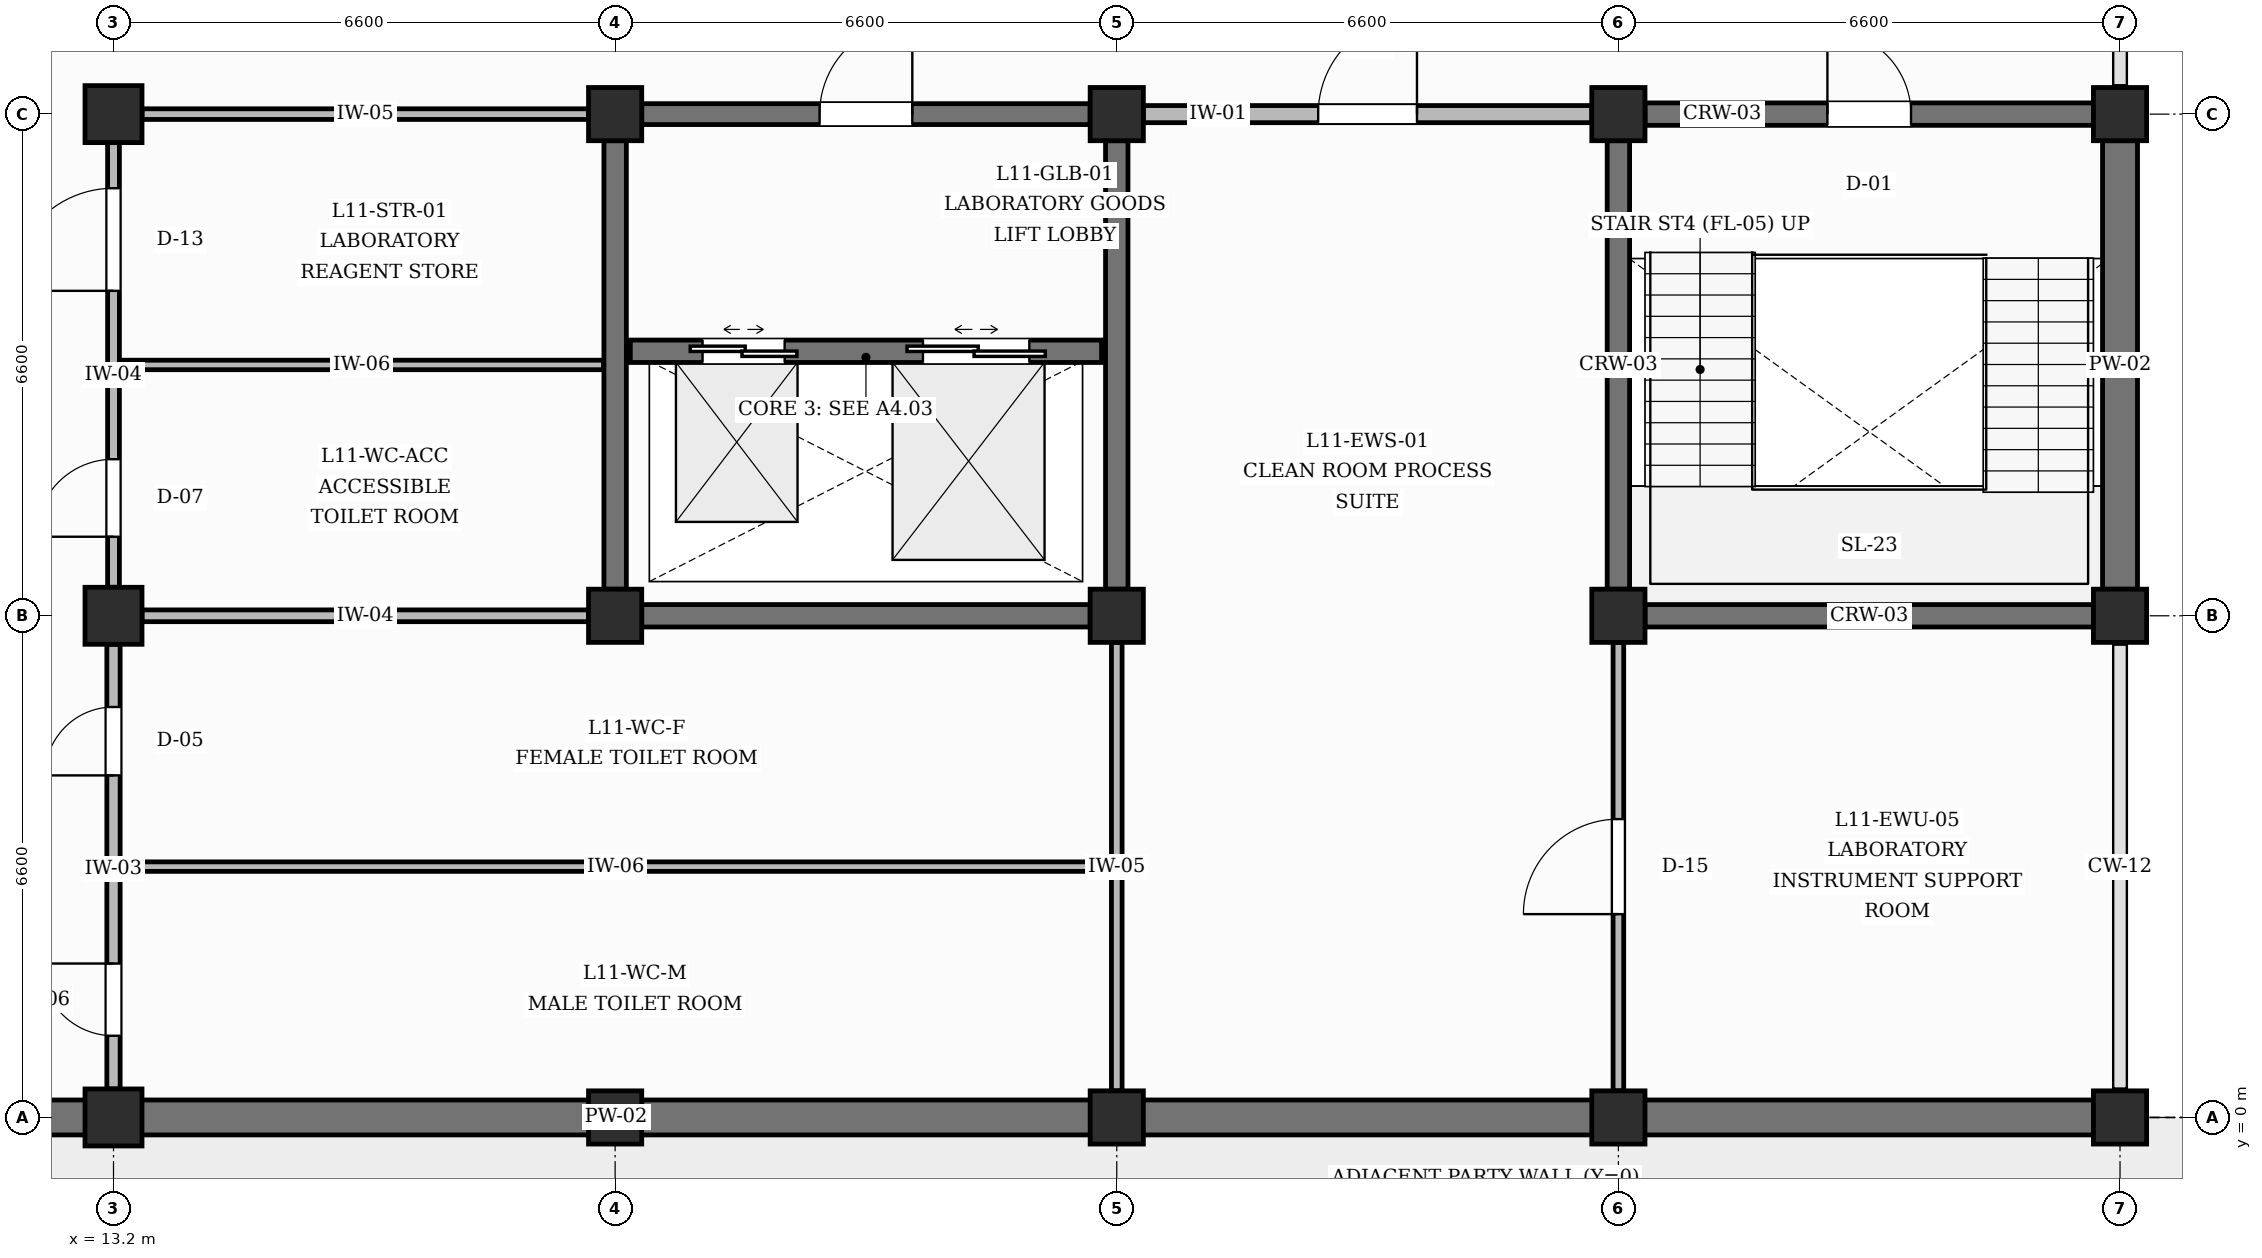
"""IFC4 building model, lengths in metres.
Left out: names, types, materials, properties, quantities, classifications, styles, units other than length and angle.
Written with IfcOpenShell. Run it as: python <this file> out.ifc"""

import sys

from ifc_helpers import new_model, si_unit, direction, frame, frame_2d, origin, origin_2d, place, context, subcontext, project, spatial, rectangle, extrude, element, fill, save


model = new_model("IFC4")
c1 = context("Model", 3, precision=1e-05, world=origin(), true_north=direction((0.0, 1.0)))
c2 = subcontext(c1, "Body", "Model", "MODEL_VIEW")
j1 = project(units=[si_unit("LENGTHUNIT", "METRE"), si_unit("PLANEANGLEUNIT", "RADIAN")], contexts=[c1])
p1 = place(None, origin())
s1 = spatial("IfcSite", under=j1, at=p1, CompositionType="ELEMENT")
p2 = place(p1, origin())
s2 = spatial("IfcBuilding", under=s1, at=p2, CompositionType="ELEMENT")
p3 = place(p2, frame((0.0, 0.0, 48.0)))
s3 = spatial("IfcBuildingStorey", under=s2, at=p3, CompositionType="ELEMENT", Elevation=48.0)
for number, where, z_axis, x_axis in (
    (1, (13.2, 0.0, 0.0), (0.0, 0.0, 1.0), (1.0, 0.0, 0.0)),
    (2, (13.2, 6.6, 0.0), (0.0, 0.0, 1.0), (1.0, 0.0, 0.0)),
    (3, (13.2, 13.2, 0.0), (0.0, 0.0, 1.0), (1.0, 0.0, 0.0)),
):
    element("IfcColumn", number, at=place(p3, frame(where, z_axis=z_axis, x_axis=x_axis)), inside=s3, PredefinedType="COLUMN", context=c2, shape_type="SweptSolid", body=[
        extrude(rectangle(XDim=0.75, YDim=0.75, at=origin_2d()), origin(), (0.0, 0.0, 1.0), 4.2),
    ])
for number, where, z_axis, x_axis in (
    (4, (19.8, 0.0, 0.0), (0.0, 0.0, 1.0), (1.0, 0.0, 0.0)),
    (5, (19.8, 6.6, 0.0), (0.0, 0.0, 1.0), (1.0, 0.0, 0.0)),
    (6, (19.8, 13.2, 0.0), (0.0, 0.0, 1.0), (1.0, 0.0, 0.0)),
    (7, (26.4, 0.0, 0.0), (0.0, 0.0, 1.0), (1.0, 0.0, 0.0)),
    (8, (26.4, 6.6, 0.0), (0.0, 0.0, 1.0), (1.0, 0.0, 0.0)),
    (9, (26.4, 13.2, 0.0), (0.0, 0.0, 1.0), (1.0, 0.0, 0.0)),
    (10, (33.0, 0.0, 0.0), (0.0, 0.0, 1.0), (1.0, 0.0, 0.0)),
    (11, (33.0, 6.6, 0.0), (0.0, 0.0, 1.0), (1.0, 0.0, 0.0)),
    (12, (33.0, 13.2, 0.0), (0.0, 0.0, 1.0), (1.0, 0.0, 0.0)),
    (13, (39.6, 0.0, 0.0), (0.0, 0.0, 1.0), (1.0, 0.0, 0.0)),
    (14, (39.6, 6.6, 0.0), (0.0, 0.0, 1.0), (1.0, 0.0, 0.0)),
    (15, (39.6, 13.2, 0.0), (0.0, 0.0, 1.0), (1.0, 0.0, 0.0)),
):
    element("IfcColumn", number, at=place(p3, frame(where, z_axis=z_axis, x_axis=x_axis)), inside=s3, PredefinedType="COLUMN", context=c2, shape_type="SweptSolid", body=[
        extrude(rectangle(XDim=0.7, YDim=0.7, at=origin_2d()), origin(), (0.0, 0.0, 1.0), 4.2),
    ])
p4 = place(p3, frame((6.975, 0.0, 0.0), z_axis=(0.0, 0.0, 1.0), x_axis=(1.0, 0.0, 0.0)))
e16 = element("IfcWall", 16, at=p4, inside=s3, PredefinedType="SOLIDWALL", context=c2, shape_type="SweptSolid", body=[
    extrude(rectangle(XDim=5.85, YDim=0.46, at=frame_2d((2.925, 0.0))), origin(), (0.0, 0.0, 1.0), 3.29),
])
p5 = place(p3, frame((13.575, 0.0, 0.0), z_axis=(0.0, 0.0, 1.0), x_axis=(1.0, 0.0, 0.0)))
e17 = element("IfcWall", 17, at=p5, inside=s3, PredefinedType="SOLIDWALL", context=c2, shape_type="SweptSolid", body=[
    extrude(rectangle(XDim=5.875, YDim=0.46, at=frame_2d((2.938, 0.0))), origin(), (0.0, 0.0, 1.0), 3.29),
])
p6 = place(p3, frame((20.15, 0.0, 0.0), z_axis=(0.0, 0.0, 1.0), x_axis=(1.0, 0.0, 0.0)))
e18 = element("IfcWall", 18, at=p6, inside=s3, PredefinedType="SOLIDWALL", context=c2, shape_type="SweptSolid", body=[
    extrude(rectangle(XDim=5.9, YDim=0.46, at=frame_2d((2.95, 0.0))), origin(), (0.0, 0.0, 1.0), 3.29),
])
for number, where, z_axis, x_axis in (
    (19, (26.75, 0.0, 0.0), (0.0, 0.0, 1.0), (1.0, 0.0, 0.0)),
    (20, (33.35, 0.0, 0.0), (0.0, 0.0, 1.0), (1.0, 0.0, 0.0)),
):
    element("IfcWall", number, at=place(p3, frame(where, z_axis=z_axis, x_axis=x_axis)), inside=s3, PredefinedType="SOLIDWALL", context=c2, shape_type="SweptSolid", body=[
        extrude(rectangle(XDim=5.9, YDim=0.46, at=frame_2d((2.95, 0.0))), origin(), (0.0, 0.0, 1.0), 3.29),
    ])
p7 = place(p3, frame((39.6, 6.95, 0.0), z_axis=(0.0, 0.0, 1.0), x_axis=(0.0, 1.0, 0.0)))
e21 = element("IfcWall", 21, at=p7, inside=s3, PredefinedType="SOLIDWALL", context=c2, shape_type="SweptSolid", body=[
    extrude(rectangle(XDim=5.9, YDim=0.46, at=frame_2d((2.95, 0.0))), origin(), (0.0, 0.0, 1.0), 3.29),
])
p8 = place(p3, frame((33.35, 6.6, 0.0), z_axis=(0.0, 0.0, 1.0), x_axis=(1.0, 0.0, 0.0)))
e22 = element("IfcWall", 22, at=p8, inside=s3, PredefinedType="SHEAR", context=c2, shape_type="SweptSolid", body=[
    extrude(rectangle(XDim=5.9, YDim=0.295, at=frame_2d((2.95, 0.0))), origin(), (0.0, 0.0, 1.0), 3.29),
])
p9 = place(p3, frame((33.35, 13.2, 0.0), z_axis=(0.0, 0.0, 1.0), x_axis=(1.0, 0.0, 0.0)))
e23 = element("IfcWall", 23, at=p9, inside=s3, PredefinedType="SHEAR", context=c2, shape_type="SweptSolid", body=[
    extrude(rectangle(XDim=5.9, YDim=0.295, at=frame_2d((2.95, 0.0))), origin(), (0.0, 0.0, 1.0), 3.29),
])
p10 = place(p9, frame((2.4, 0.0, 0.0)))
e24 = element("IfcOpeningElement", 24, at=p10, cuts=e23, PredefinedType="OPENING", context=c2, shape_type="SweptSolid", body=[
    extrude(rectangle(XDim=1.1, YDim=2.15, at=frame_2d((0.55, 1.075))), frame((0.0, 0.157, 0.0), z_axis=(0.0, -1.0, 0.0), x_axis=(1.0, 0.0, 0.0)), (0.0, 0.0, 1.0), 0.315),
])
for number, where, z_axis, x_axis in (
    (25, (33.0, 6.95, 0.0), (0.0, 0.0, 1.0), (0.0, 1.0, 0.0)),
    (26, (20.15, 6.6, 0.0), (0.0, 0.0, 1.0), (1.0, 0.0, 0.0)),
    (27, (19.8, 6.95, 0.0), (0.0, 0.0, 1.0), (0.0, 1.0, 0.0)),
    (28, (26.4, 6.95, 0.0), (0.0, 0.0, 1.0), (0.0, 1.0, 0.0)),
):
    element("IfcWall", number, at=place(p3, frame(where, z_axis=z_axis, x_axis=x_axis)), inside=s3, PredefinedType="SHEAR", context=c2, shape_type="SweptSolid", body=[
        extrude(rectangle(XDim=5.9, YDim=0.295, at=frame_2d((2.95, 0.0))), origin(), (0.0, 0.0, 1.0), 3.29),
    ])
p11 = place(p3, frame((20.15, 13.2, 0.0), z_axis=(0.0, 0.0, 1.0), x_axis=(1.0, 0.0, 0.0)))
e29 = element("IfcWall", 29, at=p11, inside=s3, PredefinedType="SHEAR", context=c2, shape_type="SweptSolid", body=[
    extrude(rectangle(XDim=5.9, YDim=0.275, at=frame_2d((2.95, 0.0))), origin(), (0.0, 0.0, 1.0), 3.29),
])
p12 = place(p11, frame((2.34, 0.0, 0.0)))
e30 = element("IfcOpeningElement", 30, at=p12, cuts=e29, PredefinedType="OPENING", context=c2, shape_type="SweptSolid", body=[
    extrude(rectangle(XDim=1.22, YDim=2.15, at=frame_2d((0.61, 1.075))), frame((0.0, 0.147, 0.0), z_axis=(0.0, -1.0, 0.0), x_axis=(1.0, 0.0, 0.0)), (0.0, 0.0, 1.0), 0.295),
])
p13 = place(p3, frame((20.0, 10.08, 0.0), z_axis=(0.0, 0.0, 1.0), x_axis=(1.0, 0.0, 0.0)))
e31 = element("IfcWall", 31, at=p13, inside=s3, PredefinedType="SHEAR", context=c2, shape_type="SweptSolid", body=[
    extrude(rectangle(XDim=6.2, YDim=0.295, at=frame_2d((3.1, 0.0))), origin(), (0.0, 0.0, 1.0), 3.89),
])
p14 = place(p13, frame((0.95, 0.0, 0.0)))
e32 = element("IfcOpeningElement", 32, at=p14, cuts=e31, PredefinedType="OPENING", context=c2, shape_type="SweptSolid", body=[
    extrude(rectangle(XDim=1.08, YDim=2.15, at=frame_2d((0.54, 1.075))), frame((0.0, 0.157, 0.0), z_axis=(0.0, -1.0, 0.0), x_axis=(1.0, 0.0, 0.0)), (0.0, 0.0, 1.0), 0.315),
])
p15 = place(p13, frame((3.85, 0.0, 0.0)))
e33 = element("IfcOpeningElement", 33, at=p15, cuts=e31, PredefinedType="OPENING", context=c2, shape_type="SweptSolid", body=[
    extrude(rectangle(XDim=1.4, YDim=2.35, at=frame_2d((0.7, 1.175))), frame((0.0, 0.157, 0.0), z_axis=(0.0, -1.0, 0.0), x_axis=(1.0, 0.0, 0.0)), (0.0, 0.0, 1.0), 0.315),
])
p16 = place(p3, frame((13.2, 0.375, 0.0), z_axis=(0.0, 0.0, 1.0), x_axis=(0.0, 1.0, 0.0)))
e34 = element("IfcWall", 34, at=p16, inside=s3, PredefinedType="PARTITIONING", context=c2, shape_type="SweptSolid", body=[
    extrude(rectangle(XDim=5.85, YDim=0.175, at=frame_2d((2.925, 0.0))), origin(), (0.0, 0.0, 1.0), 3.29),
])
p17 = place(p16, frame((0.7, 0.0, 0.0)))
e35 = element("IfcOpeningElement", 35, at=p17, cuts=e34, PredefinedType="OPENING", context=c2, shape_type="SweptSolid", body=[
    extrude(rectangle(XDim=0.95, YDim=2.1, at=frame_2d((0.475, 1.05))), frame((0.0, 0.097, 0.0), z_axis=(0.0, -1.0, 0.0), x_axis=(1.0, 0.0, 0.0)), (0.0, 0.0, 1.0), 0.195),
])
p18 = place(p16, frame((4.125, 0.0, 0.0)))
e36 = element("IfcOpeningElement", 36, at=p18, cuts=e34, PredefinedType="OPENING", context=c2, shape_type="SweptSolid", body=[
    extrude(rectangle(XDim=0.9, YDim=2.1, at=frame_2d((0.45, 1.05))), frame((0.0, 0.097, 0.0), z_axis=(0.0, -1.0, 0.0), x_axis=(1.0, 0.0, 0.0)), (0.0, 0.0, 1.0), 0.195),
])
p19 = place(p3, frame((26.4, 0.35, 0.0), z_axis=(0.0, 0.0, 1.0), x_axis=(0.0, 1.0, 0.0)))
e37 = element("IfcWall", 37, at=p19, inside=s3, PredefinedType="PARTITIONING", context=c2, shape_type="SweptSolid", body=[
    extrude(rectangle(XDim=5.9, YDim=0.14, at=frame_2d((2.95, 0.0))), origin(), (0.0, 0.0, 1.0), 3.29),
])
p20 = place(p3, frame((13.575, 6.6, 0.0), z_axis=(0.0, 0.0, 1.0), x_axis=(1.0, 0.0, 0.0)))
e38 = element("IfcWall", 38, at=p20, inside=s3, PredefinedType="PARTITIONING", context=c2, shape_type="SweptSolid", body=[
    extrude(rectangle(XDim=5.875, YDim=0.155, at=frame_2d((2.938, 0.0))), origin(), (0.0, 0.0, 1.0), 3.29),
])
p21 = place(p3, frame((13.2, 6.975, 0.0), z_axis=(0.0, 0.0, 1.0), x_axis=(0.0, 1.0, 0.0)))
e39 = element("IfcWall", 39, at=p21, inside=s3, PredefinedType="PARTITIONING", context=c2, shape_type="SweptSolid", body=[
    extrude(rectangle(XDim=5.85, YDim=0.155, at=frame_2d((2.925, 0.0))), origin(), (0.0, 0.0, 1.0), 3.29),
])
p22 = place(p21, frame((0.665, 0.0, 0.0)))
e40 = element("IfcOpeningElement", 40, at=p22, cuts=e39, PredefinedType="OPENING", context=c2, shape_type="SweptSolid", body=[
    extrude(rectangle(XDim=1.02, YDim=2.15, at=frame_2d((0.51, 1.075))), frame((0.0, 0.087, 0.0), z_axis=(0.0, -1.0, 0.0), x_axis=(1.0, 0.0, 0.0)), (0.0, 0.0, 1.0), 0.175),
])
p23 = place(p21, frame((3.9, 0.0, 0.0)))
e41 = element("IfcOpeningElement", 41, at=p23, cuts=e39, PredefinedType="OPENING", context=c2, shape_type="SweptSolid", body=[
    extrude(rectangle(XDim=1.35, YDim=2.3, at=frame_2d((0.675, 1.15))), frame((0.0, 0.087, 0.0), z_axis=(0.0, -1.0, 0.0), x_axis=(1.0, 0.0, 0.0)), (0.0, 0.0, 1.0), 0.175),
])
p24 = place(p3, frame((13.575, 13.2, 0.0), z_axis=(0.0, 0.0, 1.0), x_axis=(1.0, 0.0, 0.0)))
e42 = element("IfcWall", 42, at=p24, inside=s3, PredefinedType="PARTITIONING", context=c2, shape_type="SweptSolid", body=[
    extrude(rectangle(XDim=5.875, YDim=0.14, at=frame_2d((2.938, 0.0))), origin(), (0.0, 0.0, 1.0), 3.29),
])
p25 = place(p3, frame((33.0, 0.35, 0.0), z_axis=(0.0, 0.0, 1.0), x_axis=(0.0, 1.0, 0.0)))
e43 = element("IfcWall", 43, at=p25, inside=s3, PredefinedType="PARTITIONING", context=c2, shape_type="SweptSolid", body=[
    extrude(rectangle(XDim=5.9, YDim=0.14, at=frame_2d((2.95, 0.0))), origin(), (0.0, 0.0, 1.0), 3.29),
])
p26 = place(p25, frame((2.325, 0.0, 0.0)))
e44 = element("IfcOpeningElement", 44, at=p26, cuts=e43, PredefinedType="OPENING", context=c2, shape_type="SweptSolid", body=[
    extrude(rectangle(XDim=1.25, YDim=2.25, at=frame_2d((0.625, 1.125))), frame((0.0, 0.08, 0.0), z_axis=(0.0, -1.0, 0.0), x_axis=(1.0, 0.0, 0.0)), (0.0, 0.0, 1.0), 0.16),
])
p27 = place(p3, frame((26.75, 13.2, 0.0), z_axis=(0.0, 0.0, 1.0), x_axis=(1.0, 0.0, 0.0)))
e45 = element("IfcWall", 45, at=p27, inside=s3, PredefinedType="PARTITIONING", context=c2, shape_type="SweptSolid", body=[
    extrude(rectangle(XDim=5.9, YDim=0.225, at=frame_2d((2.95, 0.0))), origin(), (0.0, 0.0, 1.0), 3.29),
])
p28 = place(p27, frame((2.3, 0.0, 0.0)))
e46 = element("IfcOpeningElement", 46, at=p28, cuts=e45, PredefinedType="OPENING", context=c2, shape_type="SweptSolid", body=[
    extrude(rectangle(XDim=1.3, YDim=2.3, at=frame_2d((0.65, 1.15))), frame((0.0, 0.123, 0.0), z_axis=(0.0, -1.0, 0.0), x_axis=(1.0, 0.0, 0.0)), (0.0, 0.0, 1.0), 0.245),
])
p29 = place(p3, frame((13.292, 3.3, 0.0), z_axis=(0.0, 0.0, 1.0), x_axis=(1.0, 0.0, 0.0)))
e47 = element("IfcWall", 47, at=p29, inside=s3, PredefinedType="PARTITIONING", context=c2, shape_type="SweptSolid", body=[
    extrude(rectangle(XDim=13.032, YDim=0.125, at=frame_2d((6.516, 0.0))), origin(), (0.0, 0.0, 1.0), 3.89),
])
p30 = place(p3, frame((13.282, 9.9, 0.0), z_axis=(0.0, 0.0, 1.0), x_axis=(1.0, 0.0, 0.0)))
e48 = element("IfcWall", 48, at=p30, inside=s3, PredefinedType="PARTITIONING", context=c2, shape_type="SweptSolid", body=[
    extrude(rectangle(XDim=6.365, YDim=0.125, at=frame_2d((3.183, 0.0))), origin(), (0.0, 0.0, 1.0), 3.89),
])
p31 = place(p10, origin())
e49 = element("IfcDoor", 49, at=p31, inside=s3, OperationType="SINGLE_SWING_LEFT", PredefinedType="DOOR", context=c2, shape_type="SweptSolid", body=[
    extrude(rectangle(XDim=1.1, YDim=2.15, at=frame_2d((0.55, 1.075))), frame((0.0, 0.025, 0.0), z_axis=(0.0, -1.0, 0.0), x_axis=(1.0, 0.0, 0.0)), (0.0, 0.0, 1.0), 0.05),
])
fill(e24, e49)
p32 = place(p14, origin())
e50 = element("IfcDoor", 50, at=p32, inside=s3, OperationType="DOUBLE_DOOR_SLIDING", PredefinedType="USERDEFINED", context=c2, shape_type="SweptSolid", body=[
    extrude(rectangle(XDim=1.08, YDim=2.15, at=frame_2d((0.54, 1.075))), frame((0.0, 0.025, 0.0), z_axis=(0.0, -1.0, 0.0), x_axis=(1.0, 0.0, 0.0)), (0.0, 0.0, 1.0), 0.05),
])
fill(e32, e50)
p33 = place(p15, origin())
e51 = element("IfcDoor", 51, at=p33, inside=s3, OperationType="DOUBLE_DOOR_SLIDING", PredefinedType="USERDEFINED", context=c2, shape_type="SweptSolid", body=[
    extrude(rectangle(XDim=1.4, YDim=2.35, at=frame_2d((0.7, 1.175))), frame((0.0, 0.025, 0.0), z_axis=(0.0, -1.0, 0.0), x_axis=(1.0, 0.0, 0.0)), (0.0, 0.0, 1.0), 0.05),
])
fill(e33, e51)
p34 = place(p12, origin())
e52 = element("IfcDoor", 52, at=p34, inside=s3, OperationType="SINGLE_SWING_RIGHT", PredefinedType="DOOR", context=c2, shape_type="SweptSolid", body=[
    extrude(rectangle(XDim=1.22, YDim=2.15, at=frame_2d((0.61, 1.075))), frame((0.0, 0.025, 0.0), z_axis=(0.0, -1.0, 0.0), x_axis=(1.0, 0.0, 0.0)), (0.0, 0.0, 1.0), 0.05),
])
fill(e30, e52)
p35 = place(p17, origin())
e53 = element("IfcDoor", 53, at=p35, inside=s3, OperationType="SINGLE_SWING_RIGHT", PredefinedType="DOOR", context=c2, shape_type="SweptSolid", body=[
    extrude(rectangle(XDim=0.95, YDim=2.1, at=frame_2d((0.475, 1.05))), frame((0.0, 0.025, 0.0), z_axis=(0.0, -1.0, 0.0), x_axis=(1.0, 0.0, 0.0)), (0.0, 0.0, 1.0), 0.05),
])
fill(e35, e53)
p36 = place(p18, origin())
e54 = element("IfcDoor", 54, at=p36, inside=s3, OperationType="SINGLE_SWING_LEFT", PredefinedType="DOOR", context=c2, shape_type="SweptSolid", body=[
    extrude(rectangle(XDim=0.9, YDim=2.1, at=frame_2d((0.45, 1.05))), frame((0.0, 0.025, 0.0), z_axis=(0.0, -1.0, 0.0), x_axis=(1.0, 0.0, 0.0)), (0.0, 0.0, 1.0), 0.05),
])
fill(e36, e54)
p37 = place(p22, origin())
e55 = element("IfcDoor", 55, at=p37, inside=s3, OperationType="SINGLE_SWING_LEFT", PredefinedType="DOOR", context=c2, shape_type="SweptSolid", body=[
    extrude(rectangle(XDim=1.02, YDim=2.15, at=frame_2d((0.51, 1.075))), frame((0.0, 0.025, 0.0), z_axis=(0.0, -1.0, 0.0), x_axis=(1.0, 0.0, 0.0)), (0.0, 0.0, 1.0), 0.05),
])
fill(e40, e55)
p38 = place(p23, origin())
e56 = element("IfcDoor", 56, at=p38, inside=s3, OperationType="SINGLE_SWING_LEFT", PredefinedType="DOOR", context=c2, shape_type="SweptSolid", body=[
    extrude(rectangle(XDim=1.35, YDim=2.3, at=frame_2d((0.675, 1.15))), frame((0.0, 0.025, 0.0), z_axis=(0.0, -1.0, 0.0), x_axis=(1.0, 0.0, 0.0)), (0.0, 0.0, 1.0), 0.05),
])
fill(e41, e56)
p39 = place(p28, origin())
e57 = element("IfcDoor", 57, at=p39, inside=s3, OperationType="SINGLE_SWING_RIGHT", PredefinedType="DOOR", context=c2, shape_type="SweptSolid", body=[
    extrude(rectangle(XDim=1.3, YDim=2.3, at=frame_2d((0.65, 1.15))), frame((0.0, 0.025, 0.0), z_axis=(0.0, -1.0, 0.0), x_axis=(1.0, 0.0, 0.0)), (0.0, 0.0, 1.0), 0.05),
])
fill(e46, e57)
p40 = place(p26, origin())
e58 = element("IfcDoor", 58, at=p40, inside=s3, OperationType="SINGLE_SWING_LEFT", PredefinedType="DOOR", context=c2, shape_type="SweptSolid", body=[
    extrude(rectangle(XDim=1.25, YDim=2.25, at=frame_2d((0.625, 1.125))), frame((0.0, 0.025, 0.0), z_axis=(0.0, -1.0, 0.0), x_axis=(1.0, 0.0, 0.0)), (0.0, 0.0, 1.0), 0.05),
])
fill(e44, e58)
save(model, sys.argv[1])
